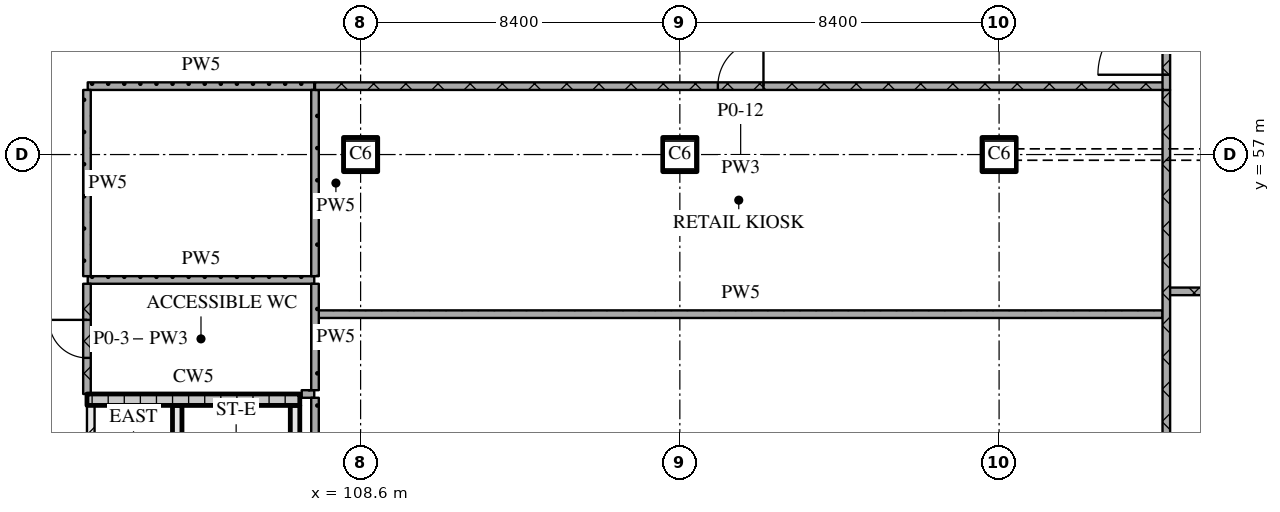
"""IFC4 building model, lengths in metres.
Left out: names, types, materials, properties, quantities, classifications, styles, units other than length and angle.
Written with IfcOpenShell. Run it as: python <this file> out.ifc"""

import sys

from ifc_helpers import new_model, si_unit, direction, frame, frame_2d, origin, origin_2d, place, context, subcontext, project, spatial, rectangle, extrude, element, fill, save


model = new_model("IFC4")
c1 = context("Model", 3, precision=1e-05, world=origin(), true_north=direction((0.0, 1.0)))
c2 = subcontext(c1, "Body", "Model", "MODEL_VIEW")
j1 = project(units=[si_unit("LENGTHUNIT", "METRE"), si_unit("PLANEANGLEUNIT", "RADIAN")], contexts=[c1])
p1 = place(None, origin())
s1 = spatial("IfcSite", under=j1, at=p1, CompositionType="ELEMENT")
p2 = place(p1, origin())
s2 = spatial("IfcBuilding", under=s1, at=p2, CompositionType="ELEMENT")
p3 = place(p2, origin())
s3 = spatial("IfcBuildingStorey", under=s2, at=p3, CompositionType="ELEMENT", Elevation=0.0)
for number, where, z_axis, x_axis in (
    (1, (108.6, 57.0, 0.0), (0.0, 0.0, 1.0), (1.0, 0.0, 0.0)),
    (2, (117.0, 57.0, 0.0), (0.0, 0.0, 1.0), (1.0, 0.0, 0.0)),
    (3, (125.4, 57.0, 0.0), (0.0, 0.0, 1.0), (1.0, 0.0, 0.0)),
):
    element("IfcColumn", number, at=place(p3, frame(where, z_axis=z_axis, x_axis=x_axis)), inside=s3, PredefinedType="COLUMN", context=c2, shape_type="SweptSolid", body=[
        extrude(rectangle(XDim=0.9, YDim=0.9, at=origin_2d()), origin(), (0.0, 0.0, 1.0), 9.0),
    ])
p4 = place(p3, frame((101.5, 43.5, 0.0), z_axis=(0.0, 0.0, 1.0), x_axis=(0.0, 1.0, 0.0)))
e4 = element("IfcWall", 4, at=p4, inside=s3, PredefinedType="PARTITIONING", context=c2, shape_type="SweptSolid", body=[
    extrude(rectangle(XDim=6.9, YDim=0.2, at=frame_2d((3.45, 0.0))), origin(), (0.0, 0.0, 1.0), 8.7),
])
p5 = place(p4, frame((1.0, 0.0, 0.0)))
e5 = element("IfcOpeningElement", 5, at=p5, cuts=e4, PredefinedType="OPENING", context=c2, shape_type="SweptSolid", body=[
    extrude(rectangle(XDim=1.0, YDim=2.1, at=frame_2d((0.5, 1.05))), frame((0.0, 0.11, 0.0), z_axis=(0.0, -1.0, 0.0), x_axis=(1.0, 0.0, 0.0)), (0.0, 0.0, 1.0), 0.22),
])
p6 = place(p3, frame((103.775, 43.5, 0.0), z_axis=(0.0, 0.0, 1.0), x_axis=(0.0, 1.0, 0.0)))
e6 = element("IfcWall", 6, at=p6, inside=s3, PredefinedType="SOLIDWALL", context=c2, shape_type="SweptSolid", body=[
    extrude(rectangle(XDim=6.9, YDim=0.25, at=frame_2d((3.45, 0.0))), origin(), (0.0, 0.0, 1.0), 8.7),
])
p7 = place(p6, frame((0.2, 0.0, 0.0)))
e7 = element("IfcOpeningElement", 7, at=p7, cuts=e6, PredefinedType="OPENING", context=c2, shape_type="SweptSolid", body=[
    extrude(rectangle(XDim=1.0, YDim=2.1, at=frame_2d((0.5, 1.05))), frame((0.0, 0.135, 0.0), z_axis=(0.0, -1.0, 0.0), x_axis=(1.0, 0.0, 0.0)), (0.0, 0.0, 1.0), 0.27),
])
p8 = place(p3, frame((106.875, 43.5, 0.0), z_axis=(0.0, 0.0, 1.0), x_axis=(0.0, 1.0, 0.0)))
e8 = element("IfcWall", 8, at=p8, inside=s3, PredefinedType="SOLIDWALL", context=c2, shape_type="SweptSolid", body=[
    extrude(rectangle(XDim=6.9, YDim=0.25, at=frame_2d((3.45, 0.0))), origin(), (0.0, 0.0, 1.0), 8.7),
])
p9 = place(p3, frame((101.4, 50.55, 0.0), z_axis=(0.0, 0.0, 1.0), x_axis=(1.0, 0.0, 0.0)))
e9 = element("IfcWall", 9, at=p9, inside=s3, PredefinedType="SOLIDWALL", context=c2, shape_type="SweptSolid", body=[
    extrude(rectangle(XDim=5.6, YDim=0.3, at=frame_2d((2.8, 0.0))), origin(), (0.0, 0.0, 1.0), 8.7),
])
p10 = place(p3, frame((129.8, 53.4, 0.0), z_axis=(0.0, 0.0, 1.0), x_axis=(1.0, 0.0, 0.0)))
e10 = element("IfcWall", 10, at=p10, inside=s3, PredefinedType="PARTITIONING", context=c2, shape_type="SweptSolid", body=[
    extrude(rectangle(XDim=12.27, YDim=0.2, at=frame_2d((6.135, 0.0))), origin(), (0.0, 0.0, 1.0), 8.7),
])
p11 = place(p10, frame((7.375, 0.0, 0.0)))
e11 = element("IfcOpeningElement", 11, at=p11, cuts=e10, PredefinedType="OPENING", context=c2, shape_type="SweptSolid", body=[
    extrude(rectangle(XDim=1.2, YDim=2.1, at=frame_2d((0.6, 1.05))), frame((0.0, 0.11, 0.0), z_axis=(0.0, -1.0, 0.0), x_axis=(1.0, 0.0, 0.0)), (0.0, 0.0, 1.0), 0.22),
])
p12 = place(p3, frame((107.05, 50.7, 0.0), z_axis=(0.0, 0.0, 1.0), x_axis=(1.0, 0.0, 0.0)))
e12 = element("IfcWall", 12, at=p12, inside=s3, PredefinedType="PARTITIONING", context=c2, shape_type="SweptSolid", body=[
    extrude(rectangle(XDim=0.33, YDim=0.2, at=frame_2d((0.165, 0.0))), origin(), (0.0, 0.0, 1.0), 8.7),
])
p13 = place(p3, frame((107.5, 52.8, 0.0), z_axis=(0.0, 0.0, 1.0), x_axis=(1.0, 0.0, 0.0)))
e13 = element("IfcWall", 13, at=p13, inside=s3, PredefinedType="PARTITIONING", context=c2, shape_type="SweptSolid", body=[
    extrude(rectangle(XDim=22.2, YDim=0.2, at=frame_2d((11.1, 0.0))), origin(), (0.0, 0.0, 1.0), 8.7),
])
p14 = place(p3, frame((101.42, 53.7, 0.0), z_axis=(0.0, 0.0, 1.0), x_axis=(1.0, 0.0, 0.0)))
e14 = element("IfcWall", 14, at=p14, inside=s3, PredefinedType="PARTITIONING", context=c2, shape_type="SweptSolid", body=[
    extrude(rectangle(XDim=5.96, YDim=0.2, at=frame_2d((2.98, 0.0))), origin(), (0.0, 0.0, 1.0), 8.7),
])
p15 = place(p3, frame((129.8, 58.8, 0.0), z_axis=(0.0, 0.0, 1.0), x_axis=(-1.0, 0.0, 0.0)))
e15 = element("IfcWall", 15, at=p15, inside=s3, PredefinedType="PARTITIONING", context=c2, shape_type="SweptSolid", body=[
    extrude(rectangle(XDim=22.4, YDim=0.2, at=frame_2d((11.2, 0.0))), origin(), (0.0, 0.0, 1.0), 8.7),
])
p16 = place(p15, frame((10.6, 0.0, 0.0)))
e16 = element("IfcOpeningElement", 16, at=p16, cuts=e15, PredefinedType="OPENING", context=c2, shape_type="SweptSolid", body=[
    extrude(rectangle(XDim=1.2, YDim=2.1, at=frame_2d((0.6, 1.05))), frame((0.0, 0.11, 0.0), z_axis=(0.0, -1.0, 0.0), x_axis=(1.0, 0.0, 0.0)), (0.0, 0.0, 1.0), 0.22),
])
p17 = place(p3, frame((101.42, 58.8, 0.0), z_axis=(0.0, 0.0, 1.0), x_axis=(1.0, 0.0, 0.0)))
e17 = element("IfcWall", 17, at=p17, inside=s3, PredefinedType="PARTITIONING", context=c2, shape_type="SweptSolid", body=[
    extrude(rectangle(XDim=5.96, YDim=0.2, at=frame_2d((2.98, 0.0))), origin(), (0.0, 0.0, 1.0), 8.7),
])
p18 = place(p3, frame((101.4, 53.6, 0.0), z_axis=(0.0, 0.0, 1.0), x_axis=(0.0, -1.0, 0.0)))
e18 = element("IfcWall", 18, at=p18, inside=s3, PredefinedType="PARTITIONING", context=c2, shape_type="SweptSolid", body=[
    extrude(rectangle(XDim=2.9, YDim=0.2, at=frame_2d((1.45, 0.0))), origin(), (0.0, 0.0, 1.0), 8.7),
])
p19 = place(p18, frame((0.95, 0.0, 0.0)))
e19 = element("IfcOpeningElement", 19, at=p19, cuts=e18, PredefinedType="OPENING", context=c2, shape_type="SweptSolid", body=[
    extrude(rectangle(XDim=1.0, YDim=2.1, at=frame_2d((0.5, 1.05))), frame((0.0, 0.11, 0.0), z_axis=(0.0, -1.0, 0.0), x_axis=(1.0, 0.0, 0.0)), (0.0, 0.0, 1.0), 0.22),
])
p20 = place(p3, frame((101.4, 58.7, 0.0), z_axis=(0.0, 0.0, 1.0), x_axis=(0.0, -1.0, 0.0)))
e20 = element("IfcWall", 20, at=p20, inside=s3, PredefinedType="PARTITIONING", context=c2, shape_type="SweptSolid", body=[
    extrude(rectangle(XDim=4.9, YDim=0.2, at=frame_2d((2.45, 0.0))), origin(), (0.0, 0.0, 1.0), 8.7),
])
p21 = place(p3, frame((107.4, 50.6, 0.0), z_axis=(0.0, 0.0, 1.0), x_axis=(0.0, -1.0, 0.0)))
e21 = element("IfcWall", 21, at=p21, inside=s3, PredefinedType="PARTITIONING", context=c2, shape_type="SweptSolid", body=[
    extrude(rectangle(XDim=7.3, YDim=0.2, at=frame_2d((3.65, 0.0))), origin(), (0.0, 0.0, 1.0), 8.7),
])
p22 = place(p3, frame((107.4, 58.7, 0.0), z_axis=(0.0, 0.0, 1.0), x_axis=(0.0, -1.0, 0.0)))
e22 = element("IfcWall", 22, at=p22, inside=s3, PredefinedType="PARTITIONING", context=c2, shape_type="SweptSolid", body=[
    extrude(rectangle(XDim=4.9, YDim=0.2, at=frame_2d((2.45, 0.0))), origin(), (0.0, 0.0, 1.0), 8.7),
])
p23 = place(p3, frame((107.4, 53.6, 0.0), z_axis=(0.0, 0.0, 1.0), x_axis=(0.0, -1.0, 0.0)))
e23 = element("IfcWall", 23, at=p23, inside=s3, PredefinedType="PARTITIONING", context=c2, shape_type="SweptSolid", body=[
    extrude(rectangle(XDim=2.8, YDim=0.2, at=frame_2d((1.4, 0.0))), origin(), (0.0, 0.0, 1.0), 8.7),
])
p24 = place(p3, frame((129.8, 58.7, 0.0), z_axis=(0.0, 0.0, 1.0), x_axis=(0.0, -1.0, 0.0)))
e24 = element("IfcWall", 24, at=p24, inside=s3, PredefinedType="PARTITIONING", context=c2, shape_type="SweptSolid", body=[
    extrude(rectangle(XDim=24.4, YDim=0.2, at=frame_2d((12.2, 0.0))), origin(), (0.0, 0.0, 1.0), 8.7),
])
p25 = place(p3, frame((129.8, 58.7, 0.0), z_axis=(0.0, 0.0, 1.0), x_axis=(0.0, 1.0, 0.0)))
e25 = element("IfcWall", 25, at=p25, inside=s3, PredefinedType="PARTITIONING", context=c2, shape_type="SweptSolid", body=[
    extrude(rectangle(XDim=2.6, YDim=0.2, at=frame_2d((1.3, 0.0))), origin(), (0.0, 0.0, 1.0), 8.7),
])
p26 = place(p25, frame((0.4, 0.0, 0.0)))
e26 = element("IfcOpeningElement", 26, at=p26, cuts=e25, PredefinedType="OPENING", context=c2, shape_type="SweptSolid", body=[
    extrude(rectangle(XDim=1.8, YDim=2.1, at=frame_2d((0.9, 1.05))), frame((0.0, 0.11, 0.0), z_axis=(0.0, -1.0, 0.0), x_axis=(1.0, 0.0, 0.0)), (0.0, 0.0, 1.0), 0.22),
])
p27 = place(p16, origin())
e27 = element("IfcDoor", 27, at=p27, inside=s3, OperationType="SINGLE_SWING_RIGHT", PredefinedType="DOOR", context=c2, shape_type="SweptSolid", body=[
    extrude(rectangle(XDim=1.2, YDim=2.1, at=frame_2d((0.6, 1.05))), frame((0.0, 0.025, 0.0), z_axis=(0.0, -1.0, 0.0), x_axis=(1.0, 0.0, 0.0)), (0.0, 0.0, 1.0), 0.05),
])
fill(e16, e27)
p28 = place(p19, origin())
e28 = element("IfcDoor", 28, at=p28, inside=s3, OperationType="SINGLE_SWING_RIGHT", PredefinedType="DOOR", context=c2, shape_type="SweptSolid", body=[
    extrude(rectangle(XDim=1.0, YDim=2.1, at=frame_2d((0.5, 1.05))), frame((0.0, 0.025, 0.0), z_axis=(0.0, -1.0, 0.0), x_axis=(1.0, 0.0, 0.0)), (0.0, 0.0, 1.0), 0.05),
])
fill(e19, e28)
p29 = place(p26, origin())
e29 = element("IfcDoor", 29, at=p29, inside=s3, OperationType="DOUBLE_DOOR_SINGLE_SWING", PredefinedType="DOOR", context=c2, shape_type="SweptSolid", body=[
    extrude(rectangle(XDim=1.8, YDim=2.1, at=frame_2d((0.9, 1.05))), frame((0.0, 0.025, 0.0), z_axis=(0.0, -1.0, 0.0), x_axis=(1.0, 0.0, 0.0)), (0.0, 0.0, 1.0), 0.05),
])
fill(e26, e29)
save(model, sys.argv[1])
